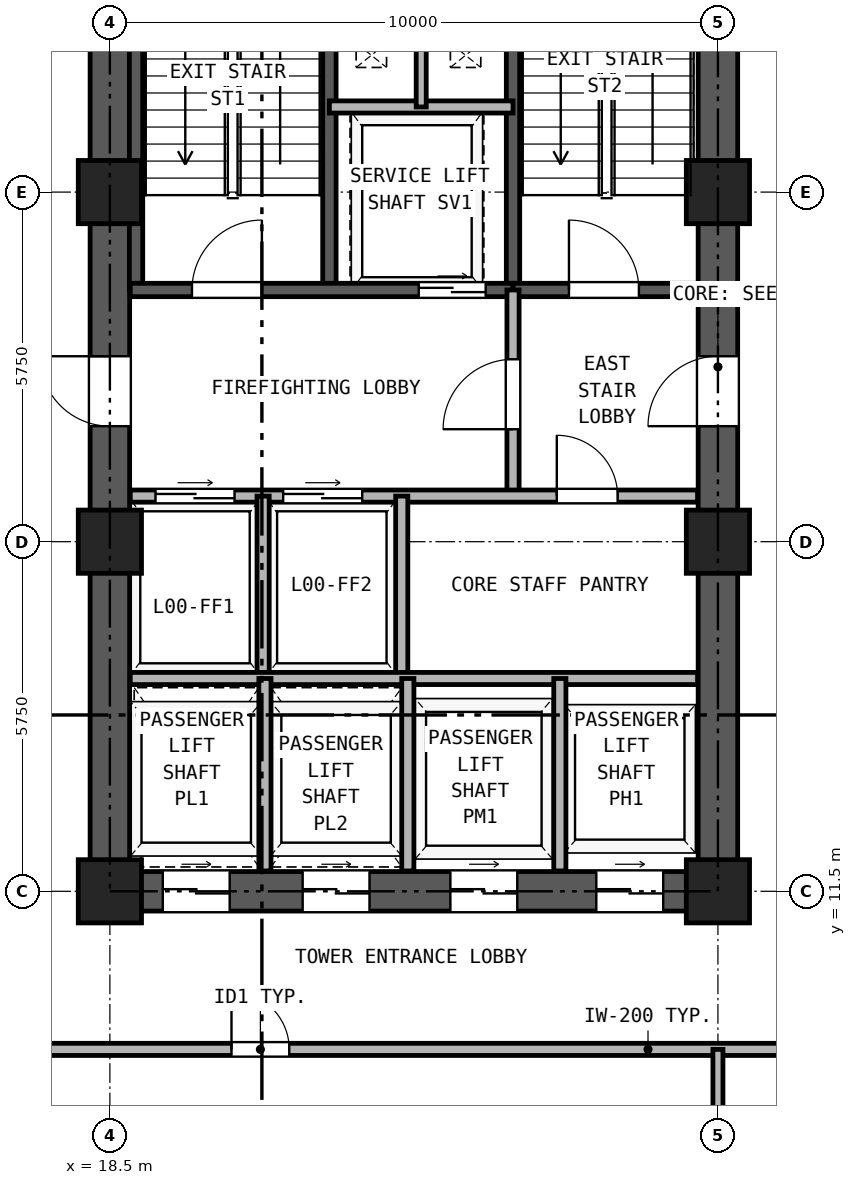
"""IFC4 building model, lengths in metres.
Left out: names, types, materials, properties, quantities, classifications, styles, units other than length and angle.
Written with IfcOpenShell. Run it as: python <this file> out.ifc"""

import sys

from ifc_helpers import new_model, si_unit, direction, frame, frame_2d, origin, origin_2d, place, context, subcontext, project, spatial, rectangle, hollow_rectangle, extrude, source, transform, mapped, element, fill, save


model = new_model("IFC4")
c1 = context("Model", 3, precision=1e-05, world=origin(), true_north=direction((0.0, 1.0)))
c2 = subcontext(c1, "Body", "Model", "MODEL_VIEW")
j1 = project(units=[si_unit("LENGTHUNIT", "METRE"), si_unit("PLANEANGLEUNIT", "RADIAN")], contexts=[c1])
p1 = place(None, origin())
s1 = spatial("IfcSite", under=j1, at=p1, CompositionType="ELEMENT")
p2 = place(p1, origin())
s2 = spatial("IfcBuilding", under=s1, at=p2, CompositionType="ELEMENT")
p3 = place(p2, origin())
s3 = spatial("IfcBuildingStorey", under=s2, at=p3, CompositionType="ELEMENT", Elevation=0.0)
m1 = source(origin(), c2, "Body", "SweptSolid", [
    extrude(hollow_rectangle(XDim=1.04, YDim=1.04, WallThickness=0.065, at=origin_2d()), origin(), (0.0, 0.0, 1.0), 4.18),
])
for number, where, z_axis, x_axis in (
    (1, (18.5, 11.5, 0.0), (0.0, 0.0, 1.0), (1.0, 0.0, 0.0)),
    (2, (18.5, 17.25, 0.0), (0.0, 0.0, 1.0), (1.0, 0.0, 0.0)),
    (3, (18.5, 23.0, 0.0), (0.0, 0.0, 1.0), (1.0, 0.0, 0.0)),
    (4, (28.5, 11.5, 0.0), (0.0, 0.0, 1.0), (1.0, 0.0, 0.0)),
    (5, (28.5, 17.25, 0.0), (0.0, 0.0, 1.0), (1.0, 0.0, 0.0)),
    (6, (28.5, 23.0, 0.0), (0.0, 0.0, 1.0), (1.0, 0.0, 0.0)),
):
    element("IfcColumn", number, at=place(p3, frame(where, z_axis=z_axis, x_axis=x_axis)), inside=s3, PredefinedType="COLUMN", context=c2, shape_type="MappedRepresentation", body=[
        mapped(m1, transform((0.0, 0.0, 0.0), x_axis=(1.0, 0.0, 0.0), y_axis=(0.0, 1.0, 0.0), z_axis=(0.0, 0.0, 1.0), scale=1.0)),
    ])
p4 = place(p3, frame((18.175, 11.5, 0.0), z_axis=(0.0, 0.0, 1.0), x_axis=(1.0, 0.0, 0.0)))
e7 = element("IfcWall", 7, at=p4, inside=s3, PredefinedType="SHEAR", context=c2, shape_type="SweptSolid", body=[
    extrude(rectangle(XDim=10.65, YDim=0.65, at=frame_2d((5.325, 0.0))), origin(), (0.0, 0.0, 1.0), 4.18),
])
p5 = place(p4, frame((1.195, 0.0, 0.0)))
e8 = element("IfcOpeningElement", 8, at=p5, cuts=e7, PredefinedType="OPENING", context=c2, shape_type="SweptSolid", body=[
    extrude(rectangle(XDim=1.1, YDim=2.25, at=frame_2d((0.55, 1.125))), frame((0.0, 0.335, 0.0), z_axis=(0.0, -1.0, 0.0), x_axis=(1.0, 0.0, 0.0)), (0.0, 0.0, 1.0), 0.67),
])
p6 = place(p4, frame((3.495, 0.0, 0.0)))
e9 = element("IfcOpeningElement", 9, at=p6, cuts=e7, PredefinedType="OPENING", context=c2, shape_type="SweptSolid", body=[
    extrude(rectangle(XDim=1.1, YDim=2.25, at=frame_2d((0.55, 1.125))), frame((0.0, 0.335, 0.0), z_axis=(0.0, -1.0, 0.0), x_axis=(1.0, 0.0, 0.0)), (0.0, 0.0, 1.0), 0.67),
])
p7 = place(p4, frame((5.925, 0.0, 0.0)))
e10 = element("IfcOpeningElement", 10, at=p7, cuts=e7, PredefinedType="OPENING", context=c2, shape_type="SweptSolid", body=[
    extrude(rectangle(XDim=1.1, YDim=2.25, at=frame_2d((0.55, 1.125))), frame((0.0, 0.335, 0.0), z_axis=(0.0, -1.0, 0.0), x_axis=(1.0, 0.0, 0.0)), (0.0, 0.0, 1.0), 0.67),
])
p8 = place(p4, frame((8.325, 0.0, 0.0)))
e11 = element("IfcOpeningElement", 11, at=p8, cuts=e7, PredefinedType="OPENING", context=c2, shape_type="SweptSolid", body=[
    extrude(rectangle(XDim=1.1, YDim=2.25, at=frame_2d((0.55, 1.125))), frame((0.0, 0.335, 0.0), z_axis=(0.0, -1.0, 0.0), x_axis=(1.0, 0.0, 0.0)), (0.0, 0.0, 1.0), 0.67),
])
p9 = place(p3, frame((18.5, 11.825, 0.0), z_axis=(0.0, 0.0, 1.0), x_axis=(0.0, 1.0, 0.0)))
e12 = element("IfcWall", 12, at=p9, inside=s3, PredefinedType="SHEAR", context=c2, shape_type="SweptSolid", body=[
    extrude(rectangle(XDim=16.6, YDim=0.65, at=frame_2d((8.3, 0.0))), origin(), (0.0, 0.0, 1.0), 4.18),
])
p10 = place(p9, frame((7.325, 0.0, 0.0)))
e13 = element("IfcOpeningElement", 13, at=p10, cuts=e12, PredefinedType="OPENING", context=c2, shape_type="SweptSolid", body=[
    extrude(rectangle(XDim=1.15, YDim=2.2, at=frame_2d((0.575, 1.1))), frame((0.0, 0.335, 0.0), z_axis=(0.0, -1.0, 0.0), x_axis=(1.0, 0.0, 0.0)), (0.0, 0.0, 1.0), 0.67),
])
p11 = place(p3, frame((28.5, 11.825, 0.0), z_axis=(0.0, 0.0, 1.0), x_axis=(0.0, 1.0, 0.0)))
e14 = element("IfcWall", 14, at=p11, inside=s3, PredefinedType="SHEAR", context=c2, shape_type="SweptSolid", body=[
    extrude(rectangle(XDim=16.6, YDim=0.65, at=frame_2d((8.3, 0.0))), origin(), (0.0, 0.0, 1.0), 4.18),
])
p12 = place(p11, frame((7.325, 0.0, 0.0)))
e15 = element("IfcOpeningElement", 15, at=p12, cuts=e14, PredefinedType="OPENING", context=c2, shape_type="SweptSolid", body=[
    extrude(rectangle(XDim=1.15, YDim=2.2, at=frame_2d((0.575, 1.1))), frame((0.0, 0.335, 0.0), z_axis=(0.0, -1.0, 0.0), x_axis=(1.0, 0.0, 0.0)), (0.0, 0.0, 1.0), 0.67),
])
for number, where, z_axis, x_axis in (
    (16, (18.93, 21.39, 0.0), (0.0, 0.0, 1.0), (0.0, 1.0, 0.0)),
    (17, (22.11, 21.39, 0.0), (0.0, 0.0, 1.0), (0.0, 1.0, 0.0)),
    (18, (25.13, 21.39, 0.0), (0.0, 0.0, 1.0), (0.0, 1.0, 0.0)),
):
    element("IfcWall", number, at=place(p3, frame(where, z_axis=z_axis, x_axis=x_axis)), inside=s3, PredefinedType="SOLIDWALL", context=c2, shape_type="SweptSolid", body=[
        extrude(rectangle(XDim=7.11, YDim=0.22, at=frame_2d((3.555, 0.0))), origin(), (0.0, 0.0, 1.0), 4.18),
    ])
p13 = place(p3, frame((18.835, 21.39, 0.0), z_axis=(0.0, 0.0, 1.0), x_axis=(1.0, 0.0, 0.0)))
e19 = element("IfcWall", 19, at=p13, inside=s3, PredefinedType="SOLIDWALL", context=c2, shape_type="SweptSolid", body=[
    extrude(rectangle(XDim=6.295, YDim=0.22, at=frame_2d((3.147, 0.0))), origin(), (0.0, 0.0, 1.0), 4.18),
])
p14 = place(p13, frame((1.015, 0.0, 0.0)))
e20 = element("IfcOpeningElement", 20, at=p14, cuts=e19, PredefinedType="OPENING", context=c2, shape_type="SweptSolid", body=[
    extrude(rectangle(XDim=1.15, YDim=2.2, at=frame_2d((0.575, 1.1))), frame((0.0, 0.12, 0.0), z_axis=(0.0, -1.0, 0.0), x_axis=(1.0, 0.0, 0.0)), (0.0, 0.0, 1.0), 0.24),
])
p15 = place(p13, frame((4.745, 0.0, 0.0)))
e21 = element("IfcOpeningElement", 21, at=p15, cuts=e19, PredefinedType="OPENING", context=c2, shape_type="SweptSolid", body=[
    extrude(rectangle(XDim=1.1, YDim=2.25, at=frame_2d((0.55, 1.125))), frame((0.0, 0.12, 0.0), z_axis=(0.0, -1.0, 0.0), x_axis=(1.0, 0.0, 0.0)), (0.0, 0.0, 1.0), 0.24),
])
p16 = place(p3, frame((25.13, 21.39, 0.0), z_axis=(0.0, 0.0, 1.0), x_axis=(1.0, 0.0, 0.0)))
e22 = element("IfcWall", 22, at=p16, inside=s3, PredefinedType="SOLIDWALL", context=c2, shape_type="SweptSolid", body=[
    extrude(rectangle(XDim=3.035, YDim=0.22, at=frame_2d((1.518, 0.0))), origin(), (0.0, 0.0, 1.0), 4.18),
])
p17 = place(p16, frame((0.92, 0.0, 0.0)))
e23 = element("IfcOpeningElement", 23, at=p17, cuts=e22, PredefinedType="OPENING", context=c2, shape_type="SweptSolid", body=[
    extrude(rectangle(XDim=1.15, YDim=2.2, at=frame_2d((0.575, 1.1))), frame((0.0, 0.12, 0.0), z_axis=(0.0, -1.0, 0.0), x_axis=(1.0, 0.0, 0.0)), (0.0, 0.0, 1.0), 0.24),
])
p18 = place(p3, frame((22.11, 24.4, 0.0), z_axis=(0.0, 0.0, 1.0), x_axis=(1.0, 0.0, 0.0)))
e24 = element("IfcWall", 24, at=p18, inside=s3, PredefinedType="PARTITIONING", context=c2, shape_type="SweptSolid", body=[
    extrude(rectangle(XDim=3.02, YDim=0.2, at=frame_2d((1.51, 0.0))), origin(), (0.0, 0.0, 1.0), 4.18),
])
p19 = place(p3, frame((23.62, 24.4, 0.0), z_axis=(0.0, 0.0, 1.0), x_axis=(0.0, 1.0, 0.0)))
e25 = element("IfcWall", 25, at=p19, inside=s3, PredefinedType="PARTITIONING", context=c2, shape_type="SweptSolid", body=[
    extrude(rectangle(XDim=4.015, YDim=0.165, at=frame_2d((2.008, 0.0))), origin(), (0.0, 0.0, 1.0), 4.18),
])
p20 = place(p3, frame((25.13, 18.0, 0.0), z_axis=(0.0, 0.0, 1.0), x_axis=(0.0, 1.0, 0.0)))
e26 = element("IfcWall", 26, at=p20, inside=s3, PredefinedType="PARTITIONING", context=c2, shape_type="SweptSolid", body=[
    extrude(rectangle(XDim=3.39, YDim=0.2, at=frame_2d((1.695, 0.0))), origin(), (0.0, 0.0, 1.0), 4.18),
])
p21 = place(p20, frame((1.1, 0.0, 0.0)))
e27 = element("IfcOpeningElement", 27, at=p21, cuts=e26, PredefinedType="OPENING", context=c2, shape_type="SweptSolid", body=[
    extrude(rectangle(XDim=1.15, YDim=2.2, at=frame_2d((0.575, 1.1))), frame((0.0, 0.11, 0.0), z_axis=(0.0, -1.0, 0.0), x_axis=(1.0, 0.0, 0.0)), (0.0, 0.0, 1.0), 0.22),
])
p22 = place(p3, frame((18.835, 18.0, 0.0), z_axis=(0.0, 0.0, 1.0), x_axis=(1.0, 0.0, 0.0)))
e28 = element("IfcWall", 28, at=p22, inside=s3, PredefinedType="PARTITIONING", context=c2, shape_type="SweptSolid", body=[
    extrude(rectangle(XDim=9.33, YDim=0.2, at=frame_2d((4.665, 0.0))), origin(), (0.0, 0.0, 1.0), 4.18),
])
p23 = place(p22, frame((0.415, 0.0, 0.0)))
e29 = element("IfcOpeningElement", 29, at=p23, cuts=e28, PredefinedType="OPENING", context=c2, shape_type="SweptSolid", body=[
    extrude(rectangle(XDim=1.3, YDim=2.3, at=frame_2d((0.65, 1.15))), frame((0.0, 0.11, 0.0), z_axis=(0.0, -1.0, 0.0), x_axis=(1.0, 0.0, 0.0)), (0.0, 0.0, 1.0), 0.22),
])
p24 = place(p22, frame((2.515, 0.0, 0.0)))
e30 = element("IfcOpeningElement", 30, at=p24, cuts=e28, PredefinedType="OPENING", context=c2, shape_type="SweptSolid", body=[
    extrude(rectangle(XDim=1.3, YDim=2.3, at=frame_2d((0.65, 1.15))), frame((0.0, 0.11, 0.0), z_axis=(0.0, -1.0, 0.0), x_axis=(1.0, 0.0, 0.0)), (0.0, 0.0, 1.0), 0.22),
])
p25 = place(p22, frame((7.015, 0.0, 0.0)))
e31 = element("IfcOpeningElement", 31, at=p25, cuts=e28, PredefinedType="OPENING", context=c2, shape_type="SweptSolid", body=[
    extrude(rectangle(XDim=1.0, YDim=2.15, at=frame_2d((0.5, 1.075))), frame((0.0, 0.11, 0.0), z_axis=(0.0, -1.0, 0.0), x_axis=(1.0, 0.0, 0.0)), (0.0, 0.0, 1.0), 0.22),
])
for number, where, z_axis, x_axis in (
    (32, (21.02, 15.0, 0.0), (0.0, 0.0, 1.0), (0.0, 1.0, 0.0)),
    (33, (23.3, 15.0, 0.0), (0.0, 0.0, 1.0), (0.0, 1.0, 0.0)),
):
    element("IfcWall", number, at=place(p3, frame(where, z_axis=z_axis, x_axis=x_axis)), inside=s3, PredefinedType="PARTITIONING", context=c2, shape_type="SweptSolid", body=[
        extrude(rectangle(XDim=3.0, YDim=0.2, at=frame_2d((1.5, 0.0))), origin(), (0.0, 0.0, 1.0), 4.18),
    ])
p26 = place(p3, frame((18.835, 15.0, 0.0), z_axis=(0.0, 0.0, 1.0), x_axis=(1.0, 0.0, 0.0)))
e34 = element("IfcWall", 34, at=p26, inside=s3, PredefinedType="PARTITIONING", context=c2, shape_type="SweptSolid", body=[
    extrude(rectangle(XDim=9.33, YDim=0.2, at=frame_2d((4.665, 0.0))), origin(), (0.0, 0.0, 1.0), 4.18),
])
for number, where, z_axis, x_axis in (
    (35, (21.05, 11.835, 0.0), (0.0, 0.0, 1.0), (0.0, 1.0, 0.0)),
    (36, (23.4, 11.835, 0.0), (0.0, 0.0, 1.0), (0.0, 1.0, 0.0)),
    (37, (25.9, 11.835, 0.0), (0.0, 0.0, 1.0), (0.0, 1.0, 0.0)),
):
    element("IfcWall", number, at=place(p3, frame(where, z_axis=z_axis, x_axis=x_axis)), inside=s3, PredefinedType="PARTITIONING", context=c2, shape_type="SweptSolid", body=[
        extrude(rectangle(XDim=3.165, YDim=0.2, at=frame_2d((1.583, 0.0))), origin(), (0.0, 0.0, 1.0), 4.18),
    ])
p27 = place(p3, frame((0.25, 8.9, 0.0), z_axis=(0.0, 0.0, 1.0), x_axis=(1.0, 0.0, 0.0)))
e38 = element("IfcWall", 38, at=p27, inside=s3, PredefinedType="PARTITIONING", context=c2, shape_type="SweptSolid", body=[
    extrude(rectangle(XDim=46.5, YDim=0.2, at=frame_2d((23.25, 0.0))), origin(), (0.0, 0.0, 1.0), 4.18),
])
p28 = place(p27, frame((10.25, 0.0, 0.0)))
e39 = element("IfcOpeningElement", 39, at=p28, cuts=e38, PredefinedType="OPENING", context=c2, shape_type="SweptSolid", body=[
    extrude(rectangle(XDim=1.0, YDim=2.15, at=frame_2d((0.5, 1.075))), frame((0.0, 0.11, 0.0), z_axis=(0.0, -1.0, 0.0), x_axis=(1.0, 0.0, 0.0)), (0.0, 0.0, 1.0), 0.22),
])
p29 = place(p27, frame((20.25, 0.0, 0.0)))
e40 = element("IfcOpeningElement", 40, at=p29, cuts=e38, PredefinedType="OPENING", context=c2, shape_type="SweptSolid", body=[
    extrude(rectangle(XDim=0.95, YDim=2.15, at=frame_2d((0.475, 1.075))), frame((0.0, 0.11, 0.0), z_axis=(0.0, -1.0, 0.0), x_axis=(1.0, 0.0, 0.0)), (0.0, 0.0, 1.0), 0.22),
])
p30 = place(p27, frame((33.0, 0.0, 0.0)))
e41 = element("IfcOpeningElement", 41, at=p30, cuts=e38, PredefinedType="OPENING", context=c2, shape_type="SweptSolid", body=[
    extrude(rectangle(XDim=0.95, YDim=2.15, at=frame_2d((0.475, 1.075))), frame((0.0, 0.11, 0.0), z_axis=(0.0, -1.0, 0.0), x_axis=(1.0, 0.0, 0.0)), (0.0, 0.0, 1.0), 0.22),
])
p31 = place(p27, frame((40.25, 0.0, 0.0)))
e42 = element("IfcOpeningElement", 42, at=p31, cuts=e38, PredefinedType="OPENING", context=c2, shape_type="SweptSolid", body=[
    extrude(rectangle(XDim=0.92, YDim=2.1, at=frame_2d((0.46, 1.05))), frame((0.0, 0.11, 0.0), z_axis=(0.0, -1.0, 0.0), x_axis=(1.0, 0.0, 0.0)), (0.0, 0.0, 1.0), 0.22),
])
p32 = place(p27, frame((44.125, 0.0, 0.0)))
e43 = element("IfcOpeningElement", 43, at=p32, cuts=e38, PredefinedType="OPENING", context=c2, shape_type="SweptSolid", body=[
    extrude(rectangle(XDim=0.92, YDim=2.1, at=frame_2d((0.46, 1.05))), frame((0.0, 0.11, 0.0), z_axis=(0.0, -1.0, 0.0), x_axis=(1.0, 0.0, 0.0)), (0.0, 0.0, 1.0), 0.22),
])
p33 = place(p3, frame((28.5, 0.25, 0.0), z_axis=(0.0, 0.0, 1.0), x_axis=(0.0, 1.0, 0.0)))
e44 = element("IfcWall", 44, at=p33, inside=s3, PredefinedType="PARTITIONING", context=c2, shape_type="SweptSolid", body=[
    extrude(rectangle(XDim=8.65, YDim=0.165, at=frame_2d((4.325, 0.0))), origin(), (0.0, 0.0, 1.0), 3.253),
])
p34 = place(p14, frame((1.15, 0.0, 0.0), z_axis=(0.0, 0.0, 1.0), x_axis=(-1.0, 0.0, 0.0)))
e45 = element("IfcDoor", 45, at=p34, inside=s3, OperationType="SINGLE_SWING_RIGHT", PredefinedType="DOOR", context=c2, shape_type="SweptSolid", body=[
    extrude(rectangle(XDim=1.15, YDim=2.2, at=frame_2d((0.575, 1.1))), frame((0.0, 0.025, 0.0), z_axis=(0.0, -1.0, 0.0), x_axis=(1.0, 0.0, 0.0)), (0.0, 0.0, 1.0), 0.05),
])
fill(e20, e45)
p35 = place(p17, frame((1.15, 0.0, 0.0), z_axis=(0.0, 0.0, 1.0), x_axis=(-1.0, 0.0, 0.0)))
e46 = element("IfcDoor", 46, at=p35, inside=s3, OperationType="SINGLE_SWING_LEFT", PredefinedType="DOOR", context=c2, shape_type="SweptSolid", body=[
    extrude(rectangle(XDim=1.15, YDim=2.2, at=frame_2d((0.575, 1.1))), frame((0.0, 0.025, 0.0), z_axis=(0.0, -1.0, 0.0), x_axis=(1.0, 0.0, 0.0)), (0.0, 0.0, 1.0), 0.05),
])
fill(e23, e46)
p36 = place(p15, frame((1.1, 0.0, 0.0), z_axis=(0.0, 0.0, 1.0), x_axis=(-1.0, 0.0, 0.0)))
e47 = element("IfcDoor", 47, at=p36, inside=s3, OperationType="DOUBLE_DOOR_SLIDING", PredefinedType="DOOR", context=c2, shape_type="SweptSolid", body=[
    extrude(rectangle(XDim=1.1, YDim=2.25, at=frame_2d((0.55, 1.125))), frame((0.0, 0.025, 0.0), z_axis=(0.0, -1.0, 0.0), x_axis=(1.0, 0.0, 0.0)), (0.0, 0.0, 1.0), 0.05),
])
fill(e21, e47)
p37 = place(p21, origin())
e48 = element("IfcDoor", 48, at=p37, inside=s3, OperationType="SINGLE_SWING_LEFT", PredefinedType="DOOR", context=c2, shape_type="SweptSolid", body=[
    extrude(rectangle(XDim=1.15, YDim=2.2, at=frame_2d((0.575, 1.1))), frame((0.0, 0.025, 0.0), z_axis=(0.0, -1.0, 0.0), x_axis=(1.0, 0.0, 0.0)), (0.0, 0.0, 1.0), 0.05),
])
fill(e27, e48)
p38 = place(p23, origin())
e49 = element("IfcDoor", 49, at=p38, inside=s3, OperationType="DOUBLE_DOOR_SLIDING", PredefinedType="DOOR", context=c2, shape_type="SweptSolid", body=[
    extrude(rectangle(XDim=1.3, YDim=2.3, at=frame_2d((0.65, 1.15))), frame((0.0, 0.025, 0.0), z_axis=(0.0, -1.0, 0.0), x_axis=(1.0, 0.0, 0.0)), (0.0, 0.0, 1.0), 0.05),
])
fill(e29, e49)
p39 = place(p24, origin())
e50 = element("IfcDoor", 50, at=p39, inside=s3, OperationType="DOUBLE_DOOR_SLIDING", PredefinedType="DOOR", context=c2, shape_type="SweptSolid", body=[
    extrude(rectangle(XDim=1.3, YDim=2.3, at=frame_2d((0.65, 1.15))), frame((0.0, 0.025, 0.0), z_axis=(0.0, -1.0, 0.0), x_axis=(1.0, 0.0, 0.0)), (0.0, 0.0, 1.0), 0.05),
])
fill(e30, e50)
p40 = place(p25, frame((1.0, 0.0, 0.0), z_axis=(0.0, 0.0, 1.0), x_axis=(-1.0, 0.0, 0.0)))
e51 = element("IfcDoor", 51, at=p40, inside=s3, OperationType="SINGLE_SWING_LEFT", PredefinedType="DOOR", context=c2, shape_type="SweptSolid", body=[
    extrude(rectangle(XDim=1.0, YDim=2.15, at=frame_2d((0.5, 1.075))), frame((0.0, 0.025, 0.0), z_axis=(0.0, -1.0, 0.0), x_axis=(1.0, 0.0, 0.0)), (0.0, 0.0, 1.0), 0.05),
])
fill(e31, e51)
p41 = place(p10, frame((1.15, 0.0, 0.0), z_axis=(0.0, 0.0, 1.0), x_axis=(-1.0, 0.0, 0.0)))
e52 = element("IfcDoor", 52, at=p41, inside=s3, OperationType="SINGLE_SWING_RIGHT", PredefinedType="DOOR", context=c2, shape_type="SweptSolid", body=[
    extrude(rectangle(XDim=1.15, YDim=2.2, at=frame_2d((0.575, 1.1))), frame((0.0, 0.025, 0.0), z_axis=(0.0, -1.0, 0.0), x_axis=(1.0, 0.0, 0.0)), (0.0, 0.0, 1.0), 0.05),
])
fill(e13, e52)
p42 = place(p12, origin())
e53 = element("IfcDoor", 53, at=p42, inside=s3, OperationType="SINGLE_SWING_LEFT", PredefinedType="DOOR", context=c2, shape_type="SweptSolid", body=[
    extrude(rectangle(XDim=1.15, YDim=2.2, at=frame_2d((0.575, 1.1))), frame((0.0, 0.025, 0.0), z_axis=(0.0, -1.0, 0.0), x_axis=(1.0, 0.0, 0.0)), (0.0, 0.0, 1.0), 0.05),
])
fill(e15, e53)
p43 = place(p5, frame((1.1, 0.0, 0.0), z_axis=(0.0, 0.0, 1.0), x_axis=(-1.0, 0.0, 0.0)))
e54 = element("IfcDoor", 54, at=p43, inside=s3, OperationType="DOUBLE_DOOR_SLIDING", PredefinedType="DOOR", context=c2, shape_type="SweptSolid", body=[
    extrude(rectangle(XDim=1.1, YDim=2.25, at=frame_2d((0.55, 1.125))), frame((0.0, 0.025, 0.0), z_axis=(0.0, -1.0, 0.0), x_axis=(1.0, 0.0, 0.0)), (0.0, 0.0, 1.0), 0.05),
])
fill(e8, e54)
p44 = place(p6, frame((1.1, 0.0, 0.0), z_axis=(0.0, 0.0, 1.0), x_axis=(-1.0, 0.0, 0.0)))
e55 = element("IfcDoor", 55, at=p44, inside=s3, OperationType="DOUBLE_DOOR_SLIDING", PredefinedType="DOOR", context=c2, shape_type="SweptSolid", body=[
    extrude(rectangle(XDim=1.1, YDim=2.25, at=frame_2d((0.55, 1.125))), frame((0.0, 0.025, 0.0), z_axis=(0.0, -1.0, 0.0), x_axis=(1.0, 0.0, 0.0)), (0.0, 0.0, 1.0), 0.05),
])
fill(e9, e55)
p45 = place(p7, frame((1.1, 0.0, 0.0), z_axis=(0.0, 0.0, 1.0), x_axis=(-1.0, 0.0, 0.0)))
e56 = element("IfcDoor", 56, at=p45, inside=s3, OperationType="DOUBLE_DOOR_SLIDING", PredefinedType="DOOR", context=c2, shape_type="SweptSolid", body=[
    extrude(rectangle(XDim=1.1, YDim=2.25, at=frame_2d((0.55, 1.125))), frame((0.0, 0.025, 0.0), z_axis=(0.0, -1.0, 0.0), x_axis=(1.0, 0.0, 0.0)), (0.0, 0.0, 1.0), 0.05),
])
fill(e10, e56)
p46 = place(p8, frame((1.1, 0.0, 0.0), z_axis=(0.0, 0.0, 1.0), x_axis=(-1.0, 0.0, 0.0)))
e57 = element("IfcDoor", 57, at=p46, inside=s3, OperationType="DOUBLE_DOOR_SLIDING", PredefinedType="DOOR", context=c2, shape_type="SweptSolid", body=[
    extrude(rectangle(XDim=1.1, YDim=2.25, at=frame_2d((0.55, 1.125))), frame((0.0, 0.025, 0.0), z_axis=(0.0, -1.0, 0.0), x_axis=(1.0, 0.0, 0.0)), (0.0, 0.0, 1.0), 0.05),
])
fill(e11, e57)
p47 = place(p29, frame((0.95, 0.0, 0.0), z_axis=(0.0, 0.0, 1.0), x_axis=(-1.0, 0.0, 0.0)))
e58 = element("IfcDoor", 58, at=p47, inside=s3, OperationType="SINGLE_SWING_LEFT", PredefinedType="DOOR", context=c2, shape_type="SweptSolid", body=[
    extrude(rectangle(XDim=0.95, YDim=2.15, at=frame_2d((0.475, 1.075))), frame((0.0, 0.025, 0.0), z_axis=(0.0, -1.0, 0.0), x_axis=(1.0, 0.0, 0.0)), (0.0, 0.0, 1.0), 0.05),
])
fill(e40, e58)
save(model, sys.argv[1])
